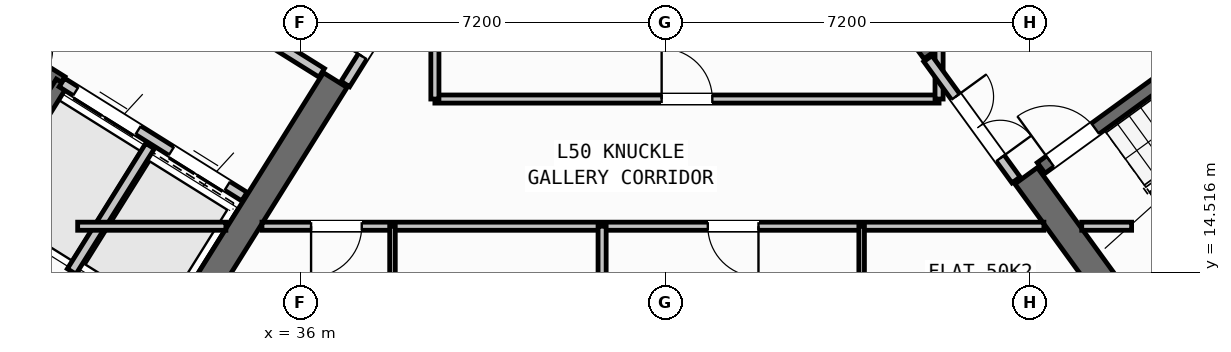
"""IFC4 building model, lengths in metres.
Left out: names, types, materials, properties, quantities, classifications, styles, units other than length and angle.
Written with IfcOpenShell. Run it as: python <this file> out.ifc"""

import sys

from ifc_helpers import new_model, si_unit, direction, frame, frame_2d, origin, place, context, subcontext, project, spatial, rectangle, extrude, source, transform, mapped, element, fill, save


model = new_model("IFC4")
c1 = context("Model", 3, precision=1e-05, world=origin(), true_north=direction((0.0, 1.0)))
c2 = subcontext(c1, "Body", "Model", "MODEL_VIEW")
j1 = project(units=[si_unit("LENGTHUNIT", "METRE"), si_unit("PLANEANGLEUNIT", "RADIAN")], contexts=[c1])
p1 = place(None, origin())
s1 = spatial("IfcSite", under=j1, at=p1, CompositionType="ELEMENT")
p2 = place(p1, origin())
s2 = spatial("IfcBuilding", under=s1, at=p2, CompositionType="ELEMENT")
p3 = place(p2, frame((0.0, 0.0, 199.5)))
s3 = spatial("IfcBuildingStorey", under=s2, at=p3, CompositionType="ELEMENT", Elevation=199.5)
p4 = place(p3, frame((33.366, 12.477, 0.0), z_axis=(0.0, 0.0, 1.0), x_axis=(-0.848047359947, 0.529920442413, 0.0)))
e1 = element("IfcWall", 1, at=p4, inside=s3, PredefinedType="SHEAR", context=c2, shape_type="SweptSolid", body=[
    extrude(rectangle(XDim=13.14, YDim=0.55, at=frame_2d((6.57, 0.0))), origin(), (0.0, 0.0, 1.0), 4.25),
])
p5 = place(p3, frame((36.683, 18.304, 0.0), z_axis=(0.0, 0.0, 1.0), x_axis=(-0.529896466841, -0.848062341122, 0.0)))
e2 = element("IfcWall", 2, at=p5, inside=s3, PredefinedType="SHEAR", context=c2, shape_type="SweptSolid", body=[
    extrude(rectangle(XDim=6.425, YDim=0.55, at=frame_2d((3.212, 0.0))), origin(), (0.0, 0.0, 1.0), 4.25),
])
p6 = place(p3, frame((52.359, 13.14, 0.0), z_axis=(0.0, 0.0, 1.0), x_axis=(0.809014896919, 0.587788139183, 0.0)))
e3 = element("IfcWall", 3, at=p6, inside=s3, PredefinedType="SHEAR", context=c2, shape_type="SweptSolid", body=[
    extrude(rectangle(XDim=12.34, YDim=0.55, at=frame_2d((6.17, 0.0))), origin(), (0.0, 0.0, 1.0), 4.25),
])
p7 = place(p3, frame((52.42, 13.524, 0.0), z_axis=(0.0, 0.0, 1.0), x_axis=(-0.587802113096, 0.809004744015, 0.0)))
e4 = element("IfcWall", 4, at=p7, inside=s3, PredefinedType="SHEAR", context=c2, shape_type="SweptSolid", body=[
    extrude(rectangle(XDim=3.575, YDim=0.55, at=frame_2d((1.788, 0.0))), origin(), (0.0, 0.0, 1.0), 4.25),
])
p8 = place(p3, frame((48.526, 18.884, 0.0), z_axis=(0.0, 0.0, 1.0), x_axis=(-0.587764933797, 0.809031756236, 0.0)))
e5 = element("IfcWall", 5, at=p8, inside=s3, PredefinedType="SHEAR", context=c2, shape_type="SweptSolid", body=[
    extrude(rectangle(XDim=6.425, YDim=0.55, at=frame_2d((3.212, 0.0))), origin(), (0.0, 0.0, 1.0), 4.25),
])
p9 = place(p3, frame((31.76, 12.183, 0.0), z_axis=(0.0, 0.0, 1.0), x_axis=(-0.848047074256, 0.529920899612, 0.0)))
e6 = element("IfcWall", 6, at=p9, inside=s3, PredefinedType="STANDARD", context=c2, shape_type="SweptSolid", body=[
    extrude(rectangle(XDim=30.652, YDim=0.32, at=frame_2d((15.326, 0.0))), origin(), (0.0, 0.0, 1.0), 4.25),
])
p10 = place(p9, frame((15.166, 0.0, 0.0)))
e7 = element("IfcOpeningElement", 7, at=p10, cuts=e6, PredefinedType="OPENING", context=c2, shape_type="SweptSolid", body=[
    extrude(rectangle(XDim=1.2, YDim=2.15, at=frame_2d((0.6, 1.075))), frame((0.0, 0.17, 0.0), z_axis=(0.0, -1.0, 0.0), x_axis=(1.0, 0.0, 0.0)), (0.0, 0.0, 1.0), 0.34),
])
p11 = place(p9, frame((1.665, 0.0, 0.65)))
e8 = element("IfcOpeningElement", 8, at=p11, cuts=e6, PredefinedType="OPENING", context=c2, shape_type="SweptSolid", body=[
    extrude(rectangle(XDim=2.8, YDim=2.1, at=frame_2d((1.4, 1.05))), frame((0.0, 0.17, 0.0), z_axis=(0.0, -1.0, 0.0), x_axis=(1.0, 0.0, 0.0)), (0.0, 0.0, 1.0), 0.34),
])
p12 = place(p9, frame((6.894, 0.0, 0.65)))
e9 = element("IfcOpeningElement", 9, at=p12, cuts=e6, PredefinedType="OPENING", context=c2, shape_type="SweptSolid", body=[
    extrude(rectangle(XDim=2.8, YDim=2.1, at=frame_2d((1.4, 1.05))), frame((0.0, 0.17, 0.0), z_axis=(0.0, -1.0, 0.0), x_axis=(1.0, 0.0, 0.0)), (0.0, 0.0, 1.0), 0.34),
])
p13 = place(p9, frame((20.453, 0.0, 0.85)))
e10 = element("IfcOpeningElement", 10, at=p13, cuts=e6, PredefinedType="OPENING", context=c2, shape_type="SweptSolid", body=[
    extrude(rectangle(XDim=1.5, YDim=1.5, at=frame_2d((0.75, 0.75))), frame((0.0, 0.17, 0.0), z_axis=(0.0, -1.0, 0.0), x_axis=(1.0, 0.0, 0.0)), (0.0, 0.0, 1.0), 0.34),
])
p14 = place(p9, frame((26.258, 0.0, 0.65)))
e11 = element("IfcOpeningElement", 11, at=p14, cuts=e6, PredefinedType="OPENING", context=c2, shape_type="SweptSolid", body=[
    extrude(rectangle(XDim=2.8, YDim=2.1, at=frame_2d((1.4, 1.05))), frame((0.0, 0.17, 0.0), z_axis=(0.0, -1.0, 0.0), x_axis=(1.0, 0.0, 0.0)), (0.0, 0.0, 1.0), 0.34),
])
p15 = place(p3, frame((31.28, 18.261, 0.0), z_axis=(0.0, 0.0, 1.0), x_axis=(-0.848051618787, 0.529913626805, 0.0)))
e12 = element("IfcWall", 12, at=p15, inside=s3, PredefinedType="SHEAR", context=c2, shape_type="SweptSolid", body=[
    extrude(rectangle(XDim=7.46, YDim=0.26, at=frame_2d((3.73, 0.0))), origin(), (0.0, 0.0, 1.0), 4.25),
])
p16 = place(p15, frame((0.36, 0.0, 0.0)))
e13 = element("IfcOpeningElement", 13, at=p16, cuts=e12, PredefinedType="OPENING", context=c2, shape_type="SweptSolid", body=[
    extrude(rectangle(XDim=0.86, YDim=2.05, at=frame_2d((0.43, 1.025))), frame((0.0, 0.14, 0.0), z_axis=(0.0, -1.0, 0.0), x_axis=(1.0, 0.0, 0.0)), (0.0, 0.0, 1.0), 0.28),
])
p17 = place(p3, frame((31.288, 18.256, 0.0), z_axis=(0.0, 0.0, 1.0), x_axis=(-0.529943379326, -0.848033026897, 0.0)))
e14 = element("IfcWall", 14, at=p17, inside=s3, PredefinedType="SHEAR", context=c2, shape_type="SweptSolid", body=[
    extrude(rectangle(XDim=3.16, YDim=0.26, at=frame_2d((1.58, 0.0))), origin(), (0.0, 0.0, 1.0), 4.25),
])
p18 = place(p3, frame((34.891, 16.005, 0.0), z_axis=(0.0, 0.0, 1.0), x_axis=(-0.848062873452, 0.529895614884, 0.0)))
e15 = element("IfcWall", 15, at=p18, inside=s3, PredefinedType="STANDARD", context=c2, shape_type="SweptSolid", body=[
    extrude(rectangle(XDim=4.248, YDim=0.2, at=frame_2d((2.124, 0.0))), origin(), (0.0, 0.0, 1.0), 4.24),
])
p19 = place(p18, frame((0.398, 0.0, 0.0)))
e16 = element("IfcOpeningElement", 16, at=p19, cuts=e15, PredefinedType="OPENING", context=c2, shape_type="SweptSolid", body=[
    extrude(rectangle(XDim=1.3, YDim=2.2, at=frame_2d((0.65, 1.1))), frame((0.0, 0.11, 0.0), z_axis=(0.0, -1.0, 0.0), x_axis=(1.0, 0.0, 0.0)), (0.0, 0.0, 1.0), 0.22),
])
p20 = place(p18, frame((2.473, 0.0, 0.0)))
e17 = element("IfcOpeningElement", 17, at=p20, cuts=e15, PredefinedType="OPENING", context=c2, shape_type="SweptSolid", body=[
    extrude(rectangle(XDim=1.45, YDim=2.25, at=frame_2d((0.725, 1.125))), frame((0.0, 0.11, 0.0), z_axis=(0.0, -1.0, 0.0), x_axis=(1.0, 0.0, 0.0)), (0.0, 0.0, 1.0), 0.22),
])
p21 = place(p3, frame((36.417, 18.447, 0.0), z_axis=(0.0, 0.0, 1.0), x_axis=(-0.848064879198, 0.529892404805, 0.0)))
e18 = element("IfcWall", 18, at=p21, inside=s3, PredefinedType="STANDARD", context=c2, shape_type="SweptSolid", body=[
    extrude(rectangle(XDim=5.768, YDim=0.2, at=frame_2d((2.884, 0.0))), origin(), (0.0, 0.0, 1.0), 4.24),
])
p22 = place(p21, frame((2.548, 0.0, 0.0)))
e19 = element("IfcOpeningElement", 19, at=p22, cuts=e18, PredefinedType="OPENING", context=c2, shape_type="SweptSolid", body=[
    extrude(rectangle(XDim=1.15, YDim=2.1, at=frame_2d((0.575, 1.05))), frame((0.0, 0.11, 0.0), z_axis=(0.0, -1.0, 0.0), x_axis=(1.0, 0.0, 0.0)), (0.0, 0.0, 1.0), 0.22),
])
p23 = place(p3, frame((33.029, 17.003, 0.0), z_axis=(0.0, 0.0, 1.0), x_axis=(-0.529916267533, -0.848049968695, 0.0)))
e20 = element("IfcWall", 20, at=p23, inside=s3, PredefinedType="STANDARD", context=c2, shape_type="SweptSolid", body=[
    extrude(rectangle(XDim=2.92, YDim=0.2, at=frame_2d((1.46, 0.0))), origin(), (0.0, 0.0, 1.0), 4.24),
])
p24 = place(p3, frame((52.472, 14.013, 0.0), z_axis=(0.0, 0.0, 1.0), x_axis=(0.809028366311, 0.587769599847, 0.0)))
e21 = element("IfcWall", 21, at=p24, inside=s3, PredefinedType="SHEAR", context=c2, shape_type="SweptSolid", body=[
    extrude(rectangle(XDim=7.33, YDim=0.26, at=frame_2d((3.665, 0.0))), origin(), (0.0, 0.0, 1.0), 4.25),
])
p25 = place(p3, frame((50.615, 16.57, 0.0), z_axis=(0.0, 0.0, 1.0), x_axis=(0.809028366311, 0.587769599847, 0.0)))
e22 = element("IfcWall", 22, at=p25, inside=s3, PredefinedType="SHEAR", context=c2, shape_type="SweptSolid", body=[
    extrude(rectangle(XDim=7.33, YDim=0.26, at=frame_2d((3.665, 0.0))), origin(), (0.0, 0.0, 1.0), 4.25),
])
p26 = place(p25, frame((0.22, 0.0, 0.0)))
e23 = element("IfcOpeningElement", 23, at=p26, cuts=e22, PredefinedType="OPENING", context=c2, shape_type="SweptSolid", body=[
    extrude(rectangle(XDim=1.1, YDim=2.1, at=frame_2d((0.55, 1.05))), frame((0.0, 0.14, 0.0), z_axis=(0.0, -1.0, 0.0), x_axis=(1.0, 0.0, 0.0)), (0.0, 0.0, 1.0), 0.28),
])
p27 = place(p3, frame((38.451, 20.737, 0.0), z_axis=(0.0, 0.0, 1.0), x_axis=(-0.529924799939, -0.848044637038, 0.0)))
e24 = element("IfcWall", 24, at=p27, inside=s3, PredefinedType="STANDARD", context=c2, shape_type="SweptSolid", body=[
    extrude(rectangle(XDim=2.96, YDim=0.2, at=frame_2d((1.48, 0.0))), origin(), (0.0, 0.0, 1.0), 4.24),
])
p28 = place(p27, frame((1.46, 0.0, 0.0)))
e25 = element("IfcOpeningElement", 25, at=p28, cuts=e24, PredefinedType="OPENING", context=c2, shape_type="SweptSolid", body=[
    extrude(rectangle(XDim=0.86, YDim=2.05, at=frame_2d((0.43, 1.025))), frame((0.0, 0.11, 0.0), z_axis=(0.0, -1.0, 0.0), x_axis=(1.0, 0.0, 0.0)), (0.0, 0.0, 1.0), 0.22),
])
p29 = place(p3, frame((31.6, 15.42, 0.0), z_axis=(0.0, 0.0, 1.0), x_axis=(1.0, 0.0, 0.0)))
e26 = element("IfcWall", 26, at=p29, inside=s3, PredefinedType="PARTITIONING", context=c2, shape_type="SweptSolid", body=[
    extrude(rectangle(XDim=2.925, YDim=0.16, at=frame_2d((1.462, 0.0))), origin(), (0.0, 0.0, 1.0), 4.24),
])
p30 = place(p3, frame((35.237, 15.42, 0.0), z_axis=(0.0, 0.0, 1.0), x_axis=(1.0, 0.0, 0.0)))
e27 = element("IfcWall", 27, at=p30, inside=s3, PredefinedType="PARTITIONING", context=c2, shape_type="SweptSolid", body=[
    extrude(rectangle(XDim=15.432, YDim=0.16, at=frame_2d((7.716, 0.0))), origin(), (0.0, 0.0, 1.0), 4.24),
])
p31 = place(p30, frame((0.969, 0.0, 0.0)))
e28 = element("IfcOpeningElement", 28, at=p31, cuts=e27, PredefinedType="OPENING", context=c2, shape_type="SweptSolid", body=[
    extrude(rectangle(XDim=1.0, YDim=2.1, at=frame_2d((0.5, 1.05))), frame((0.0, 0.09, 0.0), z_axis=(0.0, -1.0, 0.0), x_axis=(1.0, 0.0, 0.0)), (0.0, 0.0, 1.0), 0.18),
])
p32 = place(p30, frame((8.799, 0.0, 0.0)))
e29 = element("IfcOpeningElement", 29, at=p32, cuts=e27, PredefinedType="OPENING", context=c2, shape_type="SweptSolid", body=[
    extrude(rectangle(XDim=1.0, YDim=2.1, at=frame_2d((0.5, 1.05))), frame((0.0, 0.09, 0.0), z_axis=(0.0, -1.0, 0.0), x_axis=(1.0, 0.0, 0.0)), (0.0, 0.0, 1.0), 0.18),
])
p33 = place(p3, frame((51.416, 15.42, 0.0), z_axis=(0.0, 0.0, 1.0), x_axis=(1.0, 0.0, 0.0)))
e30 = element("IfcWall", 30, at=p33, inside=s3, PredefinedType="PARTITIONING", context=c2, shape_type="SweptSolid", body=[
    extrude(rectangle(XDim=0.984, YDim=0.16, at=frame_2d((0.492, 0.0))), origin(), (0.0, 0.0, 1.0), 4.24),
])
p34 = place(p3, frame((38.65, 17.93, 0.0), z_axis=(0.0, 0.0, 1.0), x_axis=(1.0, 0.0, 0.0)))
e31 = element("IfcWall", 31, at=p34, inside=s3, PredefinedType="PARTITIONING", context=c2, shape_type="SweptSolid", body=[
    extrude(rectangle(XDim=9.95, YDim=0.16, at=frame_2d((4.975, 0.0))), origin(), (0.0, 0.0, 1.0), 4.24),
])
p35 = place(p34, frame((4.475, 0.0, 0.0)))
e32 = element("IfcOpeningElement", 32, at=p35, cuts=e31, PredefinedType="OPENING", context=c2, shape_type="SweptSolid", body=[
    extrude(rectangle(XDim=1.0, YDim=2.1, at=frame_2d((0.5, 1.05))), frame((0.0, 0.09, 0.0), z_axis=(0.0, -1.0, 0.0), x_axis=(1.0, 0.0, 0.0)), (0.0, 0.0, 1.0), 0.18),
])
p36 = place(p3, frame((38.65, 17.93, 0.0), z_axis=(0.0, 0.0, 1.0), x_axis=(0.0, 1.0, 0.0)))
e33 = element("IfcWall", 33, at=p36, inside=s3, PredefinedType="PARTITIONING", context=c2, shape_type="SweptSolid", body=[
    extrude(rectangle(XDim=2.951, YDim=0.16, at=frame_2d((1.476, 0.0))), origin(), (0.0, 0.0, 1.0), 4.24),
])
p37 = place(p3, frame((48.6, 17.93, 0.0), z_axis=(0.0, 0.0, 1.0), x_axis=(0.0, 1.0, 0.0)))
e34 = element("IfcWall", 34, at=p37, inside=s3, PredefinedType="PARTITIONING", context=c2, shape_type="SweptSolid", body=[
    extrude(rectangle(XDim=0.993, YDim=0.16, at=frame_2d((0.496, 0.0))), origin(), (0.0, 0.0, 1.0), 4.24),
])
p38 = place(p3, frame((50.119, 16.333, 0.0), z_axis=(0.0, 0.0, 1.0), x_axis=(-0.587749856981, 0.809042709391, 0.0)))
e35 = element("IfcWall", 35, at=p38, inside=s3, PredefinedType="STANDARD", context=c2, shape_type="SweptSolid", body=[
    extrude(rectangle(XDim=2.96, YDim=0.2, at=frame_2d((1.48, 0.0))), origin(), (0.0, 0.0, 1.0), 4.24),
])
p39 = place(p38, frame((0.53, 0.0, 0.0)))
e36 = element("IfcOpeningElement", 36, at=p39, cuts=e35, PredefinedType="OPENING", context=c2, shape_type="SweptSolid", body=[
    extrude(rectangle(XDim=1.5, YDim=2.15, at=frame_2d((0.75, 1.075))), frame((0.0, 0.11, 0.0), z_axis=(0.0, -1.0, 0.0), x_axis=(1.0, 0.0, 0.0)), (0.0, 0.0, 1.0), 0.22),
])
p40 = place(p3, frame((41.95, 1.96, 0.0), z_axis=(0.0, 0.0, 1.0), x_axis=(0.0, 1.0, 0.0)))
e37 = element("IfcWall", 37, at=p40, inside=s3, PredefinedType="PARTITIONING", context=c2, shape_type="SweptSolid", body=[
    extrude(rectangle(XDim=13.46, YDim=0.16, at=frame_2d((6.73, 0.0))), origin(), (0.0, 0.0, 1.0), 4.24),
])
p41 = place(p3, frame((37.813, 1.96, 0.0), z_axis=(0.0, 0.0, 1.0), x_axis=(0.0, 1.0, 0.0)))
e38 = element("IfcWall", 38, at=p41, inside=s3, PredefinedType="PARTITIONING", context=c2, shape_type="SweptSolid", body=[
    extrude(rectangle(XDim=13.46, YDim=0.11, at=frame_2d((6.73, 0.0))), origin(), (0.0, 0.0, 1.0), 4.24),
])
p42 = place(p41, frame((5.5, 0.0, 0.0)))
e39 = element("IfcOpeningElement", 39, at=p42, cuts=e38, PredefinedType="OPENING", context=c2, shape_type="SweptSolid", body=[
    extrude(rectangle(XDim=0.92, YDim=2.08, at=frame_2d((0.46, 1.04))), frame((0.0, 0.065, 0.0), z_axis=(0.0, -1.0, 0.0), x_axis=(1.0, 0.0, 0.0)), (0.0, 0.0, 1.0), 0.13),
])
p43 = place(p41, frame((10.89, 0.0, 0.0)))
e40 = element("IfcOpeningElement", 40, at=p43, cuts=e38, PredefinedType="OPENING", context=c2, shape_type="SweptSolid", body=[
    extrude(rectangle(XDim=0.88, YDim=2.08, at=frame_2d((0.44, 1.04))), frame((0.0, 0.065, 0.0), z_axis=(0.0, -1.0, 0.0), x_axis=(1.0, 0.0, 0.0)), (0.0, 0.0, 1.0), 0.13),
])
p44 = place(p3, frame((47.072, 1.96, 0.0), z_axis=(0.0, 0.0, 1.0), x_axis=(0.0, 1.0, 0.0)))
e41 = element("IfcWall", 41, at=p44, inside=s3, PredefinedType="PARTITIONING", context=c2, shape_type="SweptSolid", body=[
    extrude(rectangle(XDim=13.46, YDim=0.11, at=frame_2d((6.73, 0.0))), origin(), (0.0, 0.0, 1.0), 4.24),
])
p45 = place(p44, frame((6.6, 0.0, 0.0)))
e42 = element("IfcOpeningElement", 42, at=p45, cuts=e41, PredefinedType="OPENING", context=c2, shape_type="SweptSolid", body=[
    extrude(rectangle(XDim=0.92, YDim=2.08, at=frame_2d((0.46, 1.04))), frame((0.0, 0.065, 0.0), z_axis=(0.0, -1.0, 0.0), x_axis=(1.0, 0.0, 0.0)), (0.0, 0.0, 1.0), 0.13),
])
p46 = place(p44, frame((11.54, 0.0, 0.0)))
e43 = element("IfcOpeningElement", 43, at=p46, cuts=e41, PredefinedType="OPENING", context=c2, shape_type="SweptSolid", body=[
    extrude(rectangle(XDim=0.88, YDim=2.08, at=frame_2d((0.44, 1.04))), frame((0.0, 0.065, 0.0), z_axis=(0.0, -1.0, 0.0), x_axis=(1.0, 0.0, 0.0)), (0.0, 0.0, 1.0), 0.13),
])
m1 = source(origin(), c2, "Body", "SweptSolid", [
    extrude(rectangle(XDim=1.3, YDim=2.2, at=frame_2d((0.65, 1.1))), frame((0.0, 0.025, 0.0), z_axis=(0.0, -1.0, 0.0), x_axis=(1.0, 0.0, 0.0)), (0.0, 0.0, 1.0), 0.05),
])
p47 = place(p19, origin())
e44 = element("IfcDoor", 44, at=p47, inside=s3, OperationType="DOUBLE_DOOR_SLIDING", PredefinedType="DOOR", context=c2, shape_type="MappedRepresentation", body=[
    mapped(m1, transform((0.0, 0.0, 0.0), scale=1.0)),
])
fill(e16, e44)
m2 = source(origin(), c2, "Body", "SweptSolid", [
    extrude(rectangle(XDim=1.45, YDim=2.25, at=frame_2d((0.725, 1.125))), frame((0.0, 0.025, 0.0), z_axis=(0.0, -1.0, 0.0), x_axis=(1.0, 0.0, 0.0)), (0.0, 0.0, 1.0), 0.05),
])
p48 = place(p20, origin())
e45 = element("IfcDoor", 45, at=p48, inside=s3, OperationType="DOUBLE_DOOR_SLIDING", PredefinedType="DOOR", context=c2, shape_type="MappedRepresentation", body=[
    mapped(m2, transform((0.0, 0.0, 0.0), scale=1.0)),
])
fill(e17, e45)
m3 = source(origin(), c2, "Body", "SweptSolid", [
    extrude(rectangle(XDim=1.1, YDim=2.1, at=frame_2d((0.55, 1.05))), frame((0.0, 0.025, 0.0), z_axis=(0.0, -1.0, 0.0), x_axis=(1.0, 0.0, 0.0)), (0.0, 0.0, 1.0), 0.05),
])
p49 = place(p26, origin())
e46 = element("IfcDoor", 46, at=p49, inside=s3, OperationType="SINGLE_SWING_LEFT", PredefinedType="DOOR", context=c2, shape_type="MappedRepresentation", body=[
    mapped(m3, transform((0.0, 0.0, 0.0), scale=1.0)),
])
fill(e23, e46)
m4 = source(origin(), c2, "Body", "SweptSolid", [
    extrude(rectangle(XDim=1.0, YDim=2.1, at=frame_2d((0.5, 1.05))), frame((0.0, 0.025, 0.0), z_axis=(0.0, -1.0, 0.0), x_axis=(1.0, 0.0, 0.0)), (0.0, 0.0, 1.0), 0.05),
])
p50 = place(p35, origin())
e47 = element("IfcDoor", 47, at=p50, inside=s3, OperationType="SINGLE_SWING_LEFT", PredefinedType="DOOR", context=c2, shape_type="MappedRepresentation", body=[
    mapped(m4, transform((0.0, 0.0, 0.0), scale=1.0)),
])
fill(e32, e47)
m5 = source(origin(), c2, "Body", "SweptSolid", [
    extrude(rectangle(XDim=0.86, YDim=2.05, at=frame_2d((0.43, 1.025))), frame((0.0, 0.025, 0.0), z_axis=(0.0, -1.0, 0.0), x_axis=(1.0, 0.0, 0.0)), (0.0, 0.0, 1.0), 0.05),
])
p51 = place(p28, frame((0.86, 0.0, 0.0), z_axis=(0.0, 0.0, 1.0), x_axis=(-1.0, 0.0, 0.0)))
e48 = element("IfcDoor", 48, at=p51, inside=s3, OperationType="SINGLE_SWING_LEFT", PredefinedType="DOOR", context=c2, shape_type="MappedRepresentation", body=[
    mapped(m5, transform((0.0, 0.0, 0.0), scale=1.0)),
])
fill(e25, e48)
m6 = source(origin(), c2, "Body", "SweptSolid", [
    extrude(rectangle(XDim=1.5, YDim=2.15, at=frame_2d((0.75, 1.075))), frame((0.0, 0.025, 0.0), z_axis=(0.0, -1.0, 0.0), x_axis=(1.0, 0.0, 0.0)), (0.0, 0.0, 1.0), 0.05),
])
p52 = place(p39, frame((1.5, 0.0, 0.0), z_axis=(0.0, 0.0, 1.0), x_axis=(-1.0, 0.0, 0.0)))
e49 = element("IfcDoor", 49, at=p52, inside=s3, OperationType="DOUBLE_DOOR_SINGLE_SWING", PredefinedType="DOOR", context=c2, shape_type="MappedRepresentation", body=[
    mapped(m6, transform((0.0, 0.0, 0.0), scale=1.0)),
])
fill(e36, e49)
p53 = place(p31, frame((1.0, 0.0, 0.0), z_axis=(0.0, 0.0, 1.0), x_axis=(-1.0, 0.0, 0.0)))
e50 = element("IfcDoor", 50, at=p53, inside=s3, OperationType="SINGLE_SWING_RIGHT", PredefinedType="DOOR", context=c2, shape_type="MappedRepresentation", body=[
    mapped(m4, transform((0.0, 0.0, 0.0), scale=1.0)),
])
fill(e28, e50)
p54 = place(p32, frame((1.0, 0.0, 0.0), z_axis=(0.0, 0.0, 1.0), x_axis=(-1.0, 0.0, 0.0)))
e51 = element("IfcDoor", 51, at=p54, inside=s3, OperationType="SINGLE_SWING_LEFT", PredefinedType="DOOR", context=c2, shape_type="MappedRepresentation", body=[
    mapped(m4, transform((0.0, 0.0, 0.0), scale=1.0)),
])
fill(e29, e51)
save(model, sys.argv[1])
